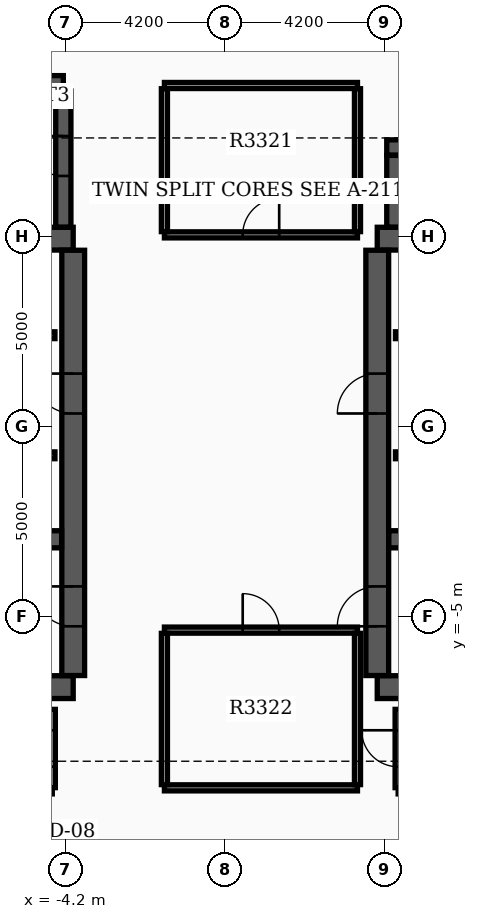
"""IFC4 building model, lengths in metres.
Left out: names, types, materials, properties, quantities, classifications, styles, units other than length and angle.
Written with IfcOpenShell. Run it as: python <this file> out.ifc"""

import sys

from ifc_helpers import new_model, si_unit, direction, frame, frame_2d, origin, place, context, subcontext, project, spatial, rectangle, extrude, element, fill, save


model = new_model("IFC4")
c1 = context("Model", 3, precision=1e-05, world=origin(), true_north=direction((0.0, 1.0)))
c2 = subcontext(c1, "Body", "Model", "MODEL_VIEW")
j1 = project(units=[si_unit("LENGTHUNIT", "METRE"), si_unit("PLANEANGLEUNIT", "RADIAN")], contexts=[c1])
p1 = place(None, origin())
s1 = spatial("IfcSite", under=j1, at=p1, CompositionType="ELEMENT")
p2 = place(p1, origin())
s2 = spatial("IfcBuilding", under=s1, at=p2, CompositionType="ELEMENT")
p3 = place(p2, frame((0.0, 0.0, 209.1)))
s3 = spatial("IfcBuildingStorey", under=s2, at=p3, CompositionType="ELEMENT", Elevation=209.1)
for number, where, z_axis, x_axis in (
    (1, (-12.4, -6.85, 0.0), (0.0, 0.0, 1.0), (1.0, 0.0, 0.0)),
    (2, (-12.4, 4.95, 0.0), (0.0, 0.0, 1.0), (1.0, 0.0, 0.0)),
):
    element("IfcWall", number, at=place(p3, frame(where, z_axis=z_axis, x_axis=x_axis)), inside=s3, PredefinedType="SHEAR", context=c2, shape_type="SweptSolid", body=[
        extrude(rectangle(XDim=8.4, YDim=0.6, at=frame_2d((4.2, 0.0))), origin(), (0.0, 0.0, 1.0), 3.7),
    ])
p4 = place(p3, frame((-4.0, -6.545, 0.0), z_axis=(0.0, 0.0, 1.0), x_axis=(0.0, 1.0, 0.0)))
e3 = element("IfcWall", 3, at=p4, inside=s3, PredefinedType="SHEAR", context=c2, shape_type="SweptSolid", body=[
    extrude(rectangle(XDim=11.19, YDim=0.6, at=frame_2d((5.595, 0.0))), origin(), (0.0, 0.0, 1.0), 3.7),
])
p5 = place(p4, frame((1.295, 0.0, 0.0)))
e4 = element("IfcOpeningElement", 4, at=p5, cuts=e3, PredefinedType="OPENING", context=c2, shape_type="SweptSolid", body=[
    extrude(rectangle(XDim=1.05, YDim=2.15, at=frame_2d((0.525, 1.075))), frame((0.0, 0.31, 0.0), z_axis=(0.0, -1.0, 0.0), x_axis=(1.0, 0.0, 0.0)), (0.0, 0.0, 1.0), 0.62),
])
p6 = place(p4, frame((6.895, 0.0, 0.0)))
e5 = element("IfcOpeningElement", 5, at=p6, cuts=e3, PredefinedType="OPENING", context=c2, shape_type="SweptSolid", body=[
    extrude(rectangle(XDim=1.05, YDim=2.15, at=frame_2d((0.525, 1.075))), frame((0.0, 0.31, 0.0), z_axis=(0.0, -1.0, 0.0), x_axis=(1.0, 0.0, 0.0)), (0.0, 0.0, 1.0), 0.62),
])
p7 = place(p3, frame((-12.095, -2.96, 0.0), z_axis=(0.0, 0.0, 1.0), x_axis=(1.0, 0.0, 0.0)))
e6 = element("IfcWall", 6, at=p7, inside=s3, PredefinedType="SHEAR", context=c2, shape_type="SweptSolid", body=[
    extrude(rectangle(XDim=7.79, YDim=0.45, at=frame_2d((3.895, 0.0))), origin(), (0.0, 0.0, 1.0), 3.7),
])
for number, where, z_axis, x_axis in (
    (7, (4.0, -6.85, 0.0), (0.0, 0.0, 1.0), (1.0, 0.0, 0.0)),
    (8, (4.0, 4.95, 0.0), (0.0, 0.0, 1.0), (1.0, 0.0, 0.0)),
):
    element("IfcWall", number, at=place(p3, frame(where, z_axis=z_axis, x_axis=x_axis)), inside=s3, PredefinedType="SHEAR", context=c2, shape_type="SweptSolid", body=[
        extrude(rectangle(XDim=8.4, YDim=0.6, at=frame_2d((4.2, 0.0))), origin(), (0.0, 0.0, 1.0), 3.7),
    ])
p8 = place(p3, frame((4.0, -6.545, 0.0), z_axis=(0.0, 0.0, 1.0), x_axis=(0.0, 1.0, 0.0)))
e9 = element("IfcWall", 9, at=p8, inside=s3, PredefinedType="SHEAR", context=c2, shape_type="SweptSolid", body=[
    extrude(rectangle(XDim=11.19, YDim=0.6, at=frame_2d((5.595, 0.0))), origin(), (0.0, 0.0, 1.0), 3.7),
])
p9 = place(p8, frame((1.295, 0.0, 0.0)))
e10 = element("IfcOpeningElement", 10, at=p9, cuts=e9, PredefinedType="OPENING", context=c2, shape_type="SweptSolid", body=[
    extrude(rectangle(XDim=1.05, YDim=2.15, at=frame_2d((0.525, 1.075))), frame((0.0, 0.31, 0.0), z_axis=(0.0, -1.0, 0.0), x_axis=(1.0, 0.0, 0.0)), (0.0, 0.0, 1.0), 0.62),
])
p10 = place(p8, frame((6.895, 0.0, 0.0)))
e11 = element("IfcOpeningElement", 11, at=p10, cuts=e9, PredefinedType="OPENING", context=c2, shape_type="SweptSolid", body=[
    extrude(rectangle(XDim=1.05, YDim=2.15, at=frame_2d((0.525, 1.075))), frame((0.0, 0.31, 0.0), z_axis=(0.0, -1.0, 0.0), x_axis=(1.0, 0.0, 0.0)), (0.0, 0.0, 1.0), 0.62),
])
p11 = place(p3, frame((4.305, -2.96, 0.0), z_axis=(0.0, 0.0, 1.0), x_axis=(1.0, 0.0, 0.0)))
e12 = element("IfcWall", 12, at=p11, inside=s3, PredefinedType="SHEAR", context=c2, shape_type="SweptSolid", body=[
    extrude(rectangle(XDim=7.79, YDim=0.45, at=frame_2d((3.895, 0.0))), origin(), (0.0, 0.0, 1.0), 3.7),
])
p12 = place(p3, frame((-12.22, 9.04, 0.0), z_axis=(0.0, 0.0, 1.0), x_axis=(1.0, 0.0, 0.0)))
e13 = element("IfcWall", 13, at=p12, inside=s3, PredefinedType="SHEAR", context=c2, shape_type="SweptSolid", body=[
    extrude(rectangle(XDim=7.96, YDim=0.4, at=frame_2d((3.98, 0.0))), origin(), (0.0, 0.0, 1.0), 3.7),
])
p13 = place(p3, frame((-4.26, 5.255, 0.0), z_axis=(0.0, 0.0, 1.0), x_axis=(0.0, 1.0, 0.0)))
e14 = element("IfcWall", 14, at=p13, inside=s3, PredefinedType="SHEAR", context=c2, shape_type="SweptSolid", body=[
    extrude(rectangle(XDim=3.58, YDim=0.4, at=frame_2d((1.79, 0.0))), origin(), (0.0, 0.0, 1.0), 3.7),
])
p14 = place(p13, frame((1.345, 0.0, 0.0)))
e15 = element("IfcOpeningElement", 15, at=p14, cuts=e14, PredefinedType="OPENING", context=c2, shape_type="SweptSolid", body=[
    extrude(rectangle(XDim=1.05, YDim=2.15, at=frame_2d((0.525, 1.075))), frame((0.0, 0.21, 0.0), z_axis=(0.0, -1.0, 0.0), x_axis=(1.0, 0.0, 0.0)), (0.0, 0.0, 1.0), 0.42),
])
p15 = place(p3, frame((4.45, 5.255, 0.0), z_axis=(0.0, 0.0, 1.0), x_axis=(0.0, 1.0, 0.0)))
e16 = element("IfcWall", 16, at=p15, inside=s3, PredefinedType="SHEAR", context=c2, shape_type="SweptSolid", body=[
    extrude(rectangle(XDim=1.885, YDim=0.4, at=frame_2d((0.942, 0.0))), origin(), (0.0, 0.0, 1.0), 3.7),
])
p16 = place(p3, frame((4.25, 7.35, 0.0), z_axis=(0.0, 0.0, 1.0), x_axis=(1.0, 0.0, 0.0)))
e17 = element("IfcWall", 17, at=p16, inside=s3, PredefinedType="SHEAR", context=c2, shape_type="SweptSolid", body=[
    extrude(rectangle(XDim=5.4, YDim=0.4, at=frame_2d((2.7, 0.0))), origin(), (0.0, 0.0, 1.0), 3.7),
])
p17 = place(p3, frame((-11.9, 2.41, 0.0), z_axis=(0.0, 0.0, 1.0), x_axis=(1.0, 0.0, 0.0)))
e18 = element("IfcWall", 18, at=p17, inside=s3, PredefinedType="SOLIDWALL", context=c2, shape_type="SweptSolid", body=[
    extrude(rectangle(XDim=7.42, YDim=0.18, at=frame_2d((3.71, 0.0))), origin(), (0.0, 0.0, 1.0), 3.17),
])
p18 = place(p17, frame((0.55, 0.0, 0.0)))
e19 = element("IfcOpeningElement", 19, at=p18, cuts=e18, PredefinedType="OPENING", context=c2, shape_type="SweptSolid", body=[
    extrude(rectangle(XDim=1.1, YDim=2.15, at=frame_2d((0.55, 1.075))), frame((0.0, 0.1, 0.0), z_axis=(0.0, -1.0, 0.0), x_axis=(1.0, 0.0, 0.0)), (0.0, 0.0, 1.0), 0.2),
])
p19 = place(p17, frame((4.9, 0.0, 0.0)))
e20 = element("IfcOpeningElement", 20, at=p19, cuts=e18, PredefinedType="OPENING", context=c2, shape_type="SweptSolid", body=[
    extrude(rectangle(XDim=0.88, YDim=2.1, at=frame_2d((0.44, 1.05))), frame((0.0, 0.1, 0.0), z_axis=(0.0, -1.0, 0.0), x_axis=(1.0, 0.0, 0.0)), (0.0, 0.0, 1.0), 0.2),
])
p20 = place(p3, frame((4.48, 2.41, 0.0), z_axis=(0.0, 0.0, 1.0), x_axis=(1.0, 0.0, 0.0)))
e21 = element("IfcWall", 21, at=p20, inside=s3, PredefinedType="SOLIDWALL", context=c2, shape_type="SweptSolid", body=[
    extrude(rectangle(XDim=7.42, YDim=0.18, at=frame_2d((3.71, 0.0))), origin(), (0.0, 0.0, 1.0), 3.17),
])
p21 = place(p20, frame((5.67, 0.0, 0.0)))
e22 = element("IfcOpeningElement", 22, at=p21, cuts=e21, PredefinedType="OPENING", context=c2, shape_type="SweptSolid", body=[
    extrude(rectangle(XDim=1.1, YDim=2.15, at=frame_2d((0.55, 1.075))), frame((0.0, 0.1, 0.0), z_axis=(0.0, -1.0, 0.0), x_axis=(1.0, 0.0, 0.0)), (0.0, 0.0, 1.0), 0.2),
])
p22 = place(p20, frame((1.6, 0.0, 0.0)))
e23 = element("IfcOpeningElement", 23, at=p22, cuts=e21, PredefinedType="OPENING", context=c2, shape_type="SweptSolid", body=[
    extrude(rectangle(XDim=0.88, YDim=2.1, at=frame_2d((0.44, 1.05))), frame((0.0, 0.1, 0.0), z_axis=(0.0, -1.0, 0.0), x_axis=(1.0, 0.0, 0.0)), (0.0, 0.0, 1.0), 0.2),
])
p23 = place(p3, frame((-11.9, -0.75, 0.0), z_axis=(0.0, 0.0, 1.0), x_axis=(1.0, 0.0, 0.0)))
e24 = element("IfcWall", 24, at=p23, inside=s3, PredefinedType="SOLIDWALL", context=c2, shape_type="SweptSolid", body=[
    extrude(rectangle(XDim=7.42, YDim=0.18, at=frame_2d((3.71, 0.0))), origin(), (0.0, 0.0, 1.0), 3.17),
])
p24 = place(p23, frame((5.75, 0.0, 0.0)))
e25 = element("IfcOpeningElement", 25, at=p24, cuts=e24, PredefinedType="OPENING", context=c2, shape_type="SweptSolid", body=[
    extrude(rectangle(XDim=1.1, YDim=2.15, at=frame_2d((0.55, 1.075))), frame((0.0, 0.1, 0.0), z_axis=(0.0, -1.0, 0.0), x_axis=(1.0, 0.0, 0.0)), (0.0, 0.0, 1.0), 0.2),
])
p25 = place(p23, frame((1.6, 0.0, 0.0)))
e26 = element("IfcOpeningElement", 26, at=p25, cuts=e24, PredefinedType="OPENING", context=c2, shape_type="SweptSolid", body=[
    extrude(rectangle(XDim=0.88, YDim=2.1, at=frame_2d((0.44, 1.05))), frame((0.0, 0.1, 0.0), z_axis=(0.0, -1.0, 0.0), x_axis=(1.0, 0.0, 0.0)), (0.0, 0.0, 1.0), 0.2),
])
p26 = place(p3, frame((4.48, -0.75, 0.0), z_axis=(0.0, 0.0, 1.0), x_axis=(1.0, 0.0, 0.0)))
e27 = element("IfcWall", 27, at=p26, inside=s3, PredefinedType="SOLIDWALL", context=c2, shape_type="SweptSolid", body=[
    extrude(rectangle(XDim=7.42, YDim=0.18, at=frame_2d((3.71, 0.0))), origin(), (0.0, 0.0, 1.0), 3.17),
])
p27 = place(p26, frame((3.92, 0.0, 0.0)))
e28 = element("IfcOpeningElement", 28, at=p27, cuts=e27, PredefinedType="OPENING", context=c2, shape_type="SweptSolid", body=[
    extrude(rectangle(XDim=1.1, YDim=2.15, at=frame_2d((0.55, 1.075))), frame((0.0, 0.1, 0.0), z_axis=(0.0, -1.0, 0.0), x_axis=(1.0, 0.0, 0.0)), (0.0, 0.0, 1.0), 0.2),
])
p28 = place(p26, frame((5.82, 0.0, 0.0)))
e29 = element("IfcOpeningElement", 29, at=p28, cuts=e27, PredefinedType="OPENING", context=c2, shape_type="SweptSolid", body=[
    extrude(rectangle(XDim=1.1, YDim=2.15, at=frame_2d((0.55, 1.075))), frame((0.0, 0.1, 0.0), z_axis=(0.0, -1.0, 0.0), x_axis=(1.0, 0.0, 0.0)), (0.0, 0.0, 1.0), 0.2),
])
p29 = place(p26, frame((1.6, 0.0, 0.0)))
e30 = element("IfcOpeningElement", 30, at=p29, cuts=e27, PredefinedType="OPENING", context=c2, shape_type="SweptSolid", body=[
    extrude(rectangle(XDim=0.88, YDim=2.1, at=frame_2d((0.44, 1.05))), frame((0.0, 0.1, 0.0), z_axis=(0.0, -1.0, 0.0), x_axis=(1.0, 0.0, 0.0)), (0.0, 0.0, 1.0), 0.2),
])
p30 = place(p3, frame((-1.6, 5.05, 0.0), z_axis=(0.0, 0.0, 1.0), x_axis=(1.0, 0.0, 0.0)))
e31 = element("IfcWall", 31, at=p30, inside=s3, PredefinedType="PARTITIONING", context=c2, shape_type="SweptSolid", body=[
    extrude(rectangle(XDim=5.08, YDim=0.16, at=frame_2d((2.54, 0.0))), origin(), (0.0, 0.0, 1.0), 3.17),
])
p31 = place(p30, frame((2.06, 0.0, 0.0)))
e32 = element("IfcOpeningElement", 32, at=p31, cuts=e31, PredefinedType="OPENING", context=c2, shape_type="SweptSolid", body=[
    extrude(rectangle(XDim=0.96, YDim=2.15, at=frame_2d((0.48, 1.075))), frame((0.0, 0.09, 0.0), z_axis=(0.0, -1.0, 0.0), x_axis=(1.0, 0.0, 0.0)), (0.0, 0.0, 1.0), 0.18),
])
p32 = place(p3, frame((-1.6, 8.98, 0.0), z_axis=(0.0, 0.0, 1.0), x_axis=(1.0, 0.0, 0.0)))
e33 = element("IfcWall", 33, at=p32, inside=s3, PredefinedType="PARTITIONING", context=c2, shape_type="SweptSolid", body=[
    extrude(rectangle(XDim=5.08, YDim=0.16, at=frame_2d((2.54, 0.0))), origin(), (0.0, 0.0, 1.0), 3.17),
])
for number, where, z_axis, x_axis in (
    (34, (-1.6, 5.135, 0.0), (0.0, 0.0, 1.0), (0.0, 1.0, 0.0)),
    (35, (3.48, 5.135, 0.0), (0.0, 0.0, 1.0), (0.0, 1.0, 0.0)),
):
    element("IfcWall", number, at=place(p3, frame(where, z_axis=z_axis, x_axis=x_axis)), inside=s3, PredefinedType="PARTITIONING", context=c2, shape_type="SweptSolid", body=[
        extrude(rectangle(XDim=3.76, YDim=0.16, at=frame_2d((1.88, 0.0))), origin(), (0.0, 0.0, 1.0), 3.17),
    ])
p33 = place(p3, frame((-1.6, -9.5, 0.0), z_axis=(0.0, 0.0, 1.0), x_axis=(1.0, 0.0, 0.0)))
e36 = element("IfcWall", 36, at=p33, inside=s3, PredefinedType="PARTITIONING", context=c2, shape_type="SweptSolid", body=[
    extrude(rectangle(XDim=5.08, YDim=0.16, at=frame_2d((2.54, 0.0))), origin(), (0.0, 0.0, 1.0), 3.17),
])
p34 = place(p3, frame((-1.6, -5.35, 0.0), z_axis=(0.0, 0.0, 1.0), x_axis=(1.0, 0.0, 0.0)))
e37 = element("IfcWall", 37, at=p34, inside=s3, PredefinedType="PARTITIONING", context=c2, shape_type="SweptSolid", body=[
    extrude(rectangle(XDim=5.08, YDim=0.16, at=frame_2d((2.54, 0.0))), origin(), (0.0, 0.0, 1.0), 3.17),
])
p35 = place(p34, frame((2.06, 0.0, 0.0)))
e38 = element("IfcOpeningElement", 38, at=p35, cuts=e37, PredefinedType="OPENING", context=c2, shape_type="SweptSolid", body=[
    extrude(rectangle(XDim=0.96, YDim=2.15, at=frame_2d((0.48, 1.075))), frame((0.0, 0.09, 0.0), z_axis=(0.0, -1.0, 0.0), x_axis=(1.0, 0.0, 0.0)), (0.0, 0.0, 1.0), 0.18),
])
for number, where, z_axis, x_axis in (
    (39, (-1.6, -9.415, 0.0), (0.0, 0.0, 1.0), (0.0, 1.0, 0.0)),
    (40, (3.48, -9.415, 0.0), (0.0, 0.0, 1.0), (0.0, 1.0, 0.0)),
):
    element("IfcWall", number, at=place(p3, frame(where, z_axis=z_axis, x_axis=x_axis)), inside=s3, PredefinedType="PARTITIONING", context=c2, shape_type="SweptSolid", body=[
        extrude(rectangle(XDim=3.98, YDim=0.16, at=frame_2d((1.99, 0.0))), origin(), (0.0, 0.0, 1.0), 3.17),
    ])
p36 = place(p3, frame((4.55, -9.58, 0.0), z_axis=(0.0, 0.0, 1.0), x_axis=(1.0, 0.0, 0.0)))
e41 = element("IfcWall", 41, at=p36, inside=s3, PredefinedType="PARTITIONING", context=c2, shape_type="SweptSolid", body=[
    extrude(rectangle(XDim=8.1, YDim=0.16, at=frame_2d((4.05, 0.0))), origin(), (0.0, 0.0, 1.0), 3.17),
])
p37 = place(p3, frame((4.55, -9.495, 0.0), z_axis=(0.0, 0.0, 1.0), x_axis=(0.0, 1.0, 0.0)))
e42 = element("IfcWall", 42, at=p37, inside=s3, PredefinedType="PARTITIONING", context=c2, shape_type="SweptSolid", body=[
    extrude(rectangle(XDim=2.06, YDim=0.16, at=frame_2d((1.03, 0.0))), origin(), (0.0, 0.0, 1.0), 3.17),
])
p38 = place(p37, frame((0.55, 0.0, 0.0)))
e43 = element("IfcOpeningElement", 43, at=p38, cuts=e42, PredefinedType="OPENING", context=c2, shape_type="SweptSolid", body=[
    extrude(rectangle(XDim=0.96, YDim=2.15, at=frame_2d((0.48, 1.075))), frame((0.0, 0.09, 0.0), z_axis=(0.0, -1.0, 0.0), x_axis=(1.0, 0.0, 0.0)), (0.0, 0.0, 1.0), 0.18),
])
p39 = place(p3, frame((-4.55, -9.495, 0.0), z_axis=(0.0, 0.0, 1.0), x_axis=(0.0, 1.0, 0.0)))
e44 = element("IfcWall", 44, at=p39, inside=s3, PredefinedType="PARTITIONING", context=c2, shape_type="SweptSolid", body=[
    extrude(rectangle(XDim=2.06, YDim=0.16, at=frame_2d((1.03, 0.0))), origin(), (0.0, 0.0, 1.0), 3.17),
])
p40 = place(p39, frame((0.55, 0.0, 0.0)))
e45 = element("IfcOpeningElement", 45, at=p40, cuts=e44, PredefinedType="OPENING", context=c2, shape_type="SweptSolid", body=[
    extrude(rectangle(XDim=0.96, YDim=2.15, at=frame_2d((0.48, 1.075))), frame((0.0, 0.09, 0.0), z_axis=(0.0, -1.0, 0.0), x_axis=(1.0, 0.0, 0.0)), (0.0, 0.0, 1.0), 0.18),
])
p41 = place(p5, origin())
e46 = element("IfcDoor", 46, at=p41, inside=s3, OperationType="SINGLE_SWING_RIGHT", PredefinedType="DOOR", context=c2, shape_type="SweptSolid", body=[
    extrude(rectangle(XDim=1.05, YDim=2.15, at=frame_2d((0.525, 1.075))), frame((0.0, 0.025, 0.0), z_axis=(0.0, -1.0, 0.0), x_axis=(1.0, 0.0, 0.0)), (0.0, 0.0, 1.0), 0.05),
])
fill(e4, e46)
p42 = place(p9, origin())
e47 = element("IfcDoor", 47, at=p42, inside=s3, OperationType="SINGLE_SWING_LEFT", PredefinedType="DOOR", context=c2, shape_type="SweptSolid", body=[
    extrude(rectangle(XDim=1.05, YDim=2.15, at=frame_2d((0.525, 1.075))), frame((0.0, 0.025, 0.0), z_axis=(0.0, -1.0, 0.0), x_axis=(1.0, 0.0, 0.0)), (0.0, 0.0, 1.0), 0.05),
])
fill(e10, e47)
p43 = place(p6, origin())
e48 = element("IfcDoor", 48, at=p43, inside=s3, OperationType="SINGLE_SWING_RIGHT", PredefinedType="DOOR", context=c2, shape_type="SweptSolid", body=[
    extrude(rectangle(XDim=1.05, YDim=2.15, at=frame_2d((0.525, 1.075))), frame((0.0, 0.025, 0.0), z_axis=(0.0, -1.0, 0.0), x_axis=(1.0, 0.0, 0.0)), (0.0, 0.0, 1.0), 0.05),
])
fill(e5, e48)
p44 = place(p10, origin())
e49 = element("IfcDoor", 49, at=p44, inside=s3, OperationType="SINGLE_SWING_LEFT", PredefinedType="DOOR", context=c2, shape_type="SweptSolid", body=[
    extrude(rectangle(XDim=1.05, YDim=2.15, at=frame_2d((0.525, 1.075))), frame((0.0, 0.025, 0.0), z_axis=(0.0, -1.0, 0.0), x_axis=(1.0, 0.0, 0.0)), (0.0, 0.0, 1.0), 0.05),
])
fill(e11, e49)
p45 = place(p14, origin())
e50 = element("IfcDoor", 50, at=p45, inside=s3, OperationType="SINGLE_SWING_RIGHT", PredefinedType="DOOR", context=c2, shape_type="SweptSolid", body=[
    extrude(rectangle(XDim=1.05, YDim=2.15, at=frame_2d((0.525, 1.075))), frame((0.0, 0.025, 0.0), z_axis=(0.0, -1.0, 0.0), x_axis=(1.0, 0.0, 0.0)), (0.0, 0.0, 1.0), 0.05),
])
fill(e15, e50)
p46 = place(p31, origin())
e51 = element("IfcDoor", 51, at=p46, inside=s3, OperationType="SINGLE_SWING_RIGHT", PredefinedType="DOOR", context=c2, shape_type="SweptSolid", body=[
    extrude(rectangle(XDim=0.96, YDim=2.15, at=frame_2d((0.48, 1.075))), frame((0.0, 0.025, 0.0), z_axis=(0.0, -1.0, 0.0), x_axis=(1.0, 0.0, 0.0)), (0.0, 0.0, 1.0), 0.05),
])
fill(e32, e51)
p47 = place(p35, origin())
e52 = element("IfcDoor", 52, at=p47, inside=s3, OperationType="SINGLE_SWING_LEFT", PredefinedType="DOOR", context=c2, shape_type="SweptSolid", body=[
    extrude(rectangle(XDim=0.96, YDim=2.15, at=frame_2d((0.48, 1.075))), frame((0.0, 0.025, 0.0), z_axis=(0.0, -1.0, 0.0), x_axis=(1.0, 0.0, 0.0)), (0.0, 0.0, 1.0), 0.05),
])
fill(e38, e52)
p48 = place(p38, origin())
e53 = element("IfcDoor", 53, at=p48, inside=s3, OperationType="SINGLE_SWING_RIGHT", PredefinedType="DOOR", context=c2, shape_type="SweptSolid", body=[
    extrude(rectangle(XDim=0.96, YDim=2.15, at=frame_2d((0.48, 1.075))), frame((0.0, 0.025, 0.0), z_axis=(0.0, -1.0, 0.0), x_axis=(1.0, 0.0, 0.0)), (0.0, 0.0, 1.0), 0.05),
])
fill(e43, e53)
p49 = place(p40, origin())
e54 = element("IfcDoor", 54, at=p49, inside=s3, OperationType="SINGLE_SWING_LEFT", PredefinedType="DOOR", context=c2, shape_type="SweptSolid", body=[
    extrude(rectangle(XDim=0.96, YDim=2.15, at=frame_2d((0.48, 1.075))), frame((0.0, 0.025, 0.0), z_axis=(0.0, -1.0, 0.0), x_axis=(1.0, 0.0, 0.0)), (0.0, 0.0, 1.0), 0.05),
])
fill(e45, e54)
save(model, sys.argv[1])
